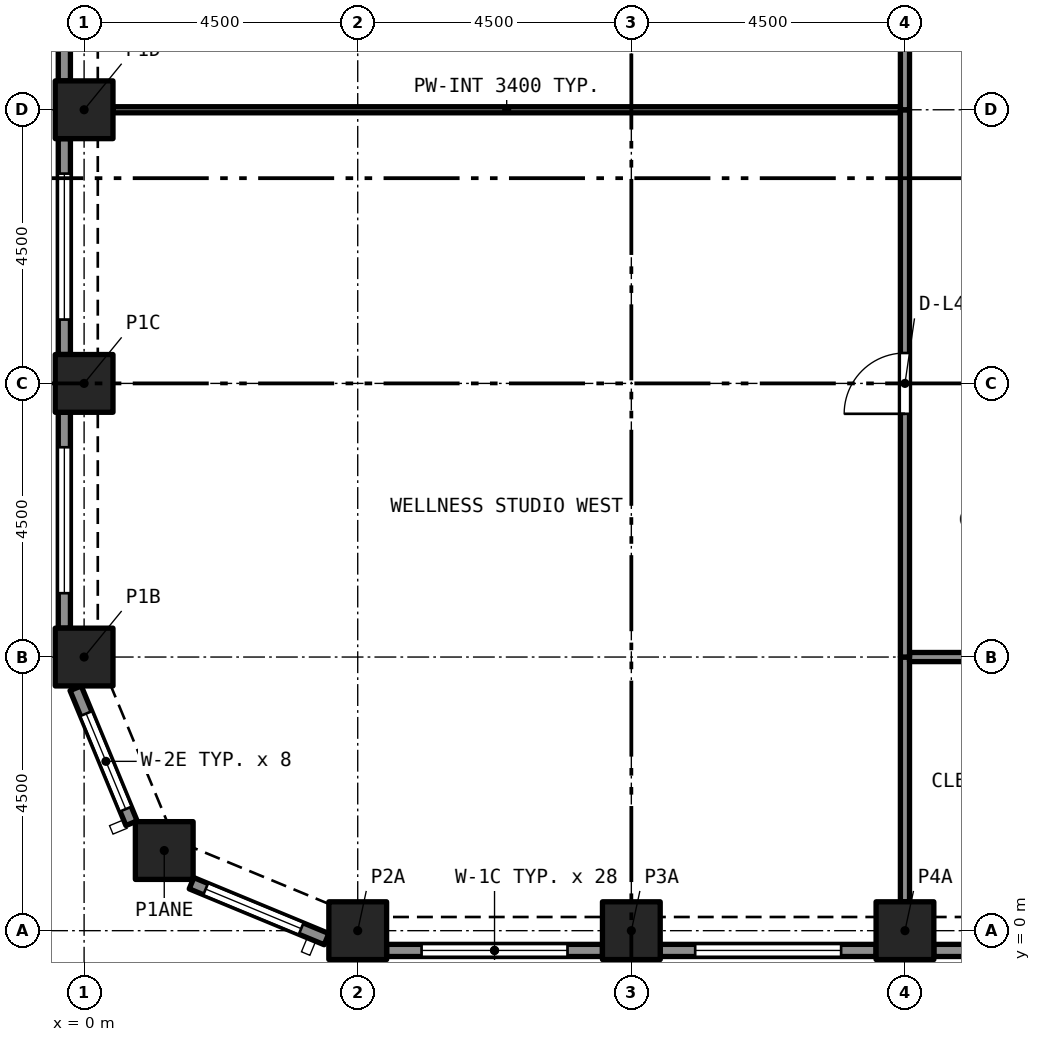
"""IFC4 building model, lengths in metres.
Left out: names, types, materials, properties, quantities, classifications, styles, units other than length and angle.
Written with IfcOpenShell. Run it as: python <this file> out.ifc"""

import sys

from ifc_helpers import new_model, si_unit, direction, frame, frame_2d, origin, origin_2d, place, context, subcontext, project, spatial, rectangle, extrude, element, fill, save


model = new_model("IFC4")
c1 = context("Model", 3, precision=1e-05, world=origin(), true_north=direction((0.0, 1.0)))
c2 = subcontext(c1, "Body", "Model", "MODEL_VIEW")
j1 = project(units=[si_unit("LENGTHUNIT", "METRE"), si_unit("PLANEANGLEUNIT", "RADIAN")], contexts=[c1])
p1 = place(None, origin())
s1 = spatial("IfcSite", under=j1, at=p1, CompositionType="ELEMENT")
p2 = place(p1, origin())
s2 = spatial("IfcBuilding", under=s1, at=p2, CompositionType="ELEMENT")
p3 = place(p2, frame((0.0, 0.0, 172.6)))
s3 = spatial("IfcBuildingStorey", under=s2, at=p3, CompositionType="ELEMENT", Elevation=172.6)
for number, where, z_axis, x_axis in (
    (1, (4.5, 0.0, 0.0), (0.0, 0.0, 1.0), (1.0, 0.0, 0.0)),
    (2, (9.0, 0.0, 0.0), (0.0, 0.0, 1.0), (1.0, 0.0, 0.0)),
    (3, (13.5, 0.0, 0.0), (0.0, 0.0, 1.0), (1.0, 0.0, 0.0)),
    (4, (1.318, 1.318, 0.0), (0.0, 0.0, 1.0), (1.0, 0.0, 0.0)),
    (5, (0.0, 4.5, 0.0), (0.0, 0.0, 1.0), (1.0, 0.0, 0.0)),
    (6, (0.0, 9.0, 0.0), (0.0, 0.0, 1.0), (1.0, 0.0, 0.0)),
    (7, (0.0, 13.5, 0.0), (0.0, 0.0, 1.0), (1.0, 0.0, 0.0)),
):
    element("IfcColumn", number, at=place(p3, frame(where, z_axis=z_axis, x_axis=x_axis)), inside=s3, PredefinedType="COLUMN", context=c2, shape_type="SweptSolid", body=[
        extrude(rectangle(XDim=0.95, YDim=0.95, at=origin_2d()), origin(), (0.0, 0.0, 1.0), 3.7),
    ])
p4 = place(p3, frame((0.78, 1.767, 0.0), z_axis=(0.0, 0.0, 1.0), x_axis=(-0.382680855588, 0.923880599843, 0.0)))
e8 = element("IfcWall", 8, at=p4, inside=s3, PredefinedType="SOLIDWALL", context=c2, shape_type="SweptSolid", body=[
    extrude(rectangle(XDim=2.403, YDim=0.2, at=frame_2d((1.201, 0.0))), origin(), (0.0, 0.0, 1.0), 3.7),
])
p5 = place(p4, frame((0.251, 0.0, 0.45)))
e9 = element("IfcOpeningElement", 9, at=p5, cuts=e8, PredefinedType="OPENING", context=c2, shape_type="SweptSolid", body=[
    extrude(rectangle(XDim=1.7, YDim=1.95, at=frame_2d((0.85, 0.975))), frame((0.0, 0.11, 0.0), z_axis=(0.0, -1.0, 0.0), x_axis=(1.0, 0.0, 0.0)), (0.0, 0.0, 1.0), 0.22),
])
p6 = place(p3, frame((3.987, -0.139, 0.0), z_axis=(0.0, 0.0, 1.0), x_axis=(-0.923880599843, 0.382680855588, 0.0)))
e10 = element("IfcWall", 10, at=p6, inside=s3, PredefinedType="SOLIDWALL", context=c2, shape_type="SweptSolid", body=[
    extrude(rectangle(XDim=2.403, YDim=0.2, at=frame_2d((1.201, 0.0))), origin(), (0.0, 0.0, 1.0), 3.7),
])
p7 = place(p6, frame((0.451, 0.0, 0.45)))
e11 = element("IfcOpeningElement", 11, at=p7, cuts=e10, PredefinedType="OPENING", context=c2, shape_type="SweptSolid", body=[
    extrude(rectangle(XDim=1.7, YDim=1.95, at=frame_2d((0.85, 0.975))), frame((0.0, 0.11, 0.0), z_axis=(0.0, -1.0, 0.0), x_axis=(1.0, 0.0, 0.0)), (0.0, 0.0, 1.0), 0.22),
])
p8 = place(p3, frame((8.525, -0.325, 0.0), z_axis=(0.0, 0.0, 1.0), x_axis=(-1.0, 0.0, 0.0)))
e12 = element("IfcWall", 12, at=p8, inside=s3, PredefinedType="SOLIDWALL", context=c2, shape_type="SweptSolid", body=[
    extrude(rectangle(XDim=3.55, YDim=0.2, at=frame_2d((1.775, 0.0))), origin(), (0.0, 0.0, 1.0), 3.7),
])
p9 = place(p8, frame((0.575, 0.0, 0.45)))
e13 = element("IfcOpeningElement", 13, at=p9, cuts=e12, PredefinedType="OPENING", context=c2, shape_type="SweptSolid", body=[
    extrude(rectangle(XDim=2.4, YDim=1.95, at=frame_2d((1.2, 0.975))), frame((0.0, 0.11, 0.0), z_axis=(0.0, -1.0, 0.0), x_axis=(1.0, 0.0, 0.0)), (0.0, 0.0, 1.0), 0.22),
])
p10 = place(p3, frame((13.025, -0.325, 0.0), z_axis=(0.0, 0.0, 1.0), x_axis=(-1.0, 0.0, 0.0)))
e14 = element("IfcWall", 14, at=p10, inside=s3, PredefinedType="SOLIDWALL", context=c2, shape_type="SweptSolid", body=[
    extrude(rectangle(XDim=3.55, YDim=0.2, at=frame_2d((1.775, 0.0))), origin(), (0.0, 0.0, 1.0), 3.7),
])
p11 = place(p10, frame((0.575, 0.0, 0.45)))
e15 = element("IfcOpeningElement", 15, at=p11, cuts=e14, PredefinedType="OPENING", context=c2, shape_type="SweptSolid", body=[
    extrude(rectangle(XDim=2.4, YDim=1.95, at=frame_2d((1.2, 0.975))), frame((0.0, 0.11, 0.0), z_axis=(0.0, -1.0, 0.0), x_axis=(1.0, 0.0, 0.0)), (0.0, 0.0, 1.0), 0.22),
])
p12 = place(p3, frame((17.525, -0.325, 0.0), z_axis=(0.0, 0.0, 1.0), x_axis=(-1.0, 0.0, 0.0)))
e16 = element("IfcWall", 16, at=p12, inside=s3, PredefinedType="SOLIDWALL", context=c2, shape_type="SweptSolid", body=[
    extrude(rectangle(XDim=3.55, YDim=0.2, at=frame_2d((1.775, 0.0))), origin(), (0.0, 0.0, 1.0), 3.7),
])
p13 = place(p12, frame((0.575, 0.0, 0.45)))
e17 = element("IfcOpeningElement", 17, at=p13, cuts=e16, PredefinedType="OPENING", context=c2, shape_type="SweptSolid", body=[
    extrude(rectangle(XDim=2.4, YDim=1.95, at=frame_2d((1.2, 0.975))), frame((0.0, 0.11, 0.0), z_axis=(0.0, -1.0, 0.0), x_axis=(1.0, 0.0, 0.0)), (0.0, 0.0, 1.0), 0.22),
])
p14 = place(p3, frame((-0.325, 13.975, 0.0), z_axis=(0.0, 0.0, 1.0), x_axis=(0.0, 1.0, 0.0)))
e18 = element("IfcWall", 18, at=p14, inside=s3, PredefinedType="SOLIDWALL", context=c2, shape_type="SweptSolid", body=[
    extrude(rectangle(XDim=3.55, YDim=0.2, at=frame_2d((1.775, 0.0))), origin(), (0.0, 0.0, 1.0), 3.7),
])
p15 = place(p14, frame((0.575, 0.0, 0.45)))
e19 = element("IfcOpeningElement", 19, at=p15, cuts=e18, PredefinedType="OPENING", context=c2, shape_type="SweptSolid", body=[
    extrude(rectangle(XDim=2.4, YDim=1.95, at=frame_2d((1.2, 0.975))), frame((0.0, 0.11, 0.0), z_axis=(0.0, -1.0, 0.0), x_axis=(1.0, 0.0, 0.0)), (0.0, 0.0, 1.0), 0.22),
])
p16 = place(p3, frame((-0.325, 9.475, 0.0), z_axis=(0.0, 0.0, 1.0), x_axis=(0.0, 1.0, 0.0)))
e20 = element("IfcWall", 20, at=p16, inside=s3, PredefinedType="SOLIDWALL", context=c2, shape_type="SweptSolid", body=[
    extrude(rectangle(XDim=3.55, YDim=0.2, at=frame_2d((1.775, 0.0))), origin(), (0.0, 0.0, 1.0), 3.7),
])
p17 = place(p16, frame((0.575, 0.0, 0.45)))
e21 = element("IfcOpeningElement", 21, at=p17, cuts=e20, PredefinedType="OPENING", context=c2, shape_type="SweptSolid", body=[
    extrude(rectangle(XDim=2.4, YDim=1.95, at=frame_2d((1.2, 0.975))), frame((0.0, 0.11, 0.0), z_axis=(0.0, -1.0, 0.0), x_axis=(1.0, 0.0, 0.0)), (0.0, 0.0, 1.0), 0.22),
])
p18 = place(p3, frame((-0.325, 4.975, 0.0), z_axis=(0.0, 0.0, 1.0), x_axis=(0.0, 1.0, 0.0)))
e22 = element("IfcWall", 22, at=p18, inside=s3, PredefinedType="SOLIDWALL", context=c2, shape_type="SweptSolid", body=[
    extrude(rectangle(XDim=3.55, YDim=0.2, at=frame_2d((1.775, 0.0))), origin(), (0.0, 0.0, 1.0), 3.7),
])
p19 = place(p18, frame((0.575, 0.0, 0.45)))
e23 = element("IfcOpeningElement", 23, at=p19, cuts=e22, PredefinedType="OPENING", context=c2, shape_type="SweptSolid", body=[
    extrude(rectangle(XDim=2.4, YDim=1.95, at=frame_2d((1.2, 0.975))), frame((0.0, 0.11, 0.0), z_axis=(0.0, -1.0, 0.0), x_axis=(1.0, 0.0, 0.0)), (0.0, 0.0, 1.0), 0.22),
])
p20 = place(p3, frame((13.5, 0.475, 0.0), z_axis=(0.0, 0.0, 1.0), x_axis=(0.0, 1.0, 0.0)))
e24 = element("IfcWall", 24, at=p20, inside=s3, PredefinedType="PARTITIONING", context=c2, shape_type="SweptSolid", body=[
    extrude(rectangle(XDim=4.025, YDim=0.15, at=frame_2d((2.012, 0.0))), origin(), (0.0, 0.0, 1.0), 3.4),
])
p21 = place(p3, frame((17.525, 4.5, 0.0), z_axis=(0.0, 0.0, 1.0), x_axis=(-1.0, 0.0, 0.0)))
e25 = element("IfcWall", 25, at=p21, inside=s3, PredefinedType="PARTITIONING", context=c2, shape_type="SweptSolid", body=[
    extrude(rectangle(XDim=3.95, YDim=0.15, at=frame_2d((1.975, 0.0))), origin(), (0.0, 0.0, 1.0), 3.4),
])
p22 = place(p21, frame((1.613, 0.0, 0.0)))
e26 = element("IfcOpeningElement", 26, at=p22, cuts=e25, PredefinedType="OPENING", context=c2, shape_type="SweptSolid", body=[
    extrude(rectangle(XDim=0.8, YDim=2.1, at=frame_2d((0.4, 1.05))), frame((0.0, 0.085, 0.0), z_axis=(0.0, -1.0, 0.0), x_axis=(1.0, 0.0, 0.0)), (0.0, 0.0, 1.0), 0.17),
])
p23 = place(p3, frame((13.5, 4.5, 0.0), z_axis=(0.0, 0.0, 1.0), x_axis=(0.0, 1.0, 0.0)))
e27 = element("IfcWall", 27, at=p23, inside=s3, PredefinedType="PARTITIONING", context=c2, shape_type="SweptSolid", body=[
    extrude(rectangle(XDim=9.0, YDim=0.15, at=frame_2d((4.5, 0.0))), origin(), (0.0, 0.0, 1.0), 3.4),
])
p24 = place(p23, frame((4.0, 0.0, 0.0)))
e28 = element("IfcOpeningElement", 28, at=p24, cuts=e27, PredefinedType="OPENING", context=c2, shape_type="SweptSolid", body=[
    extrude(rectangle(XDim=1.0, YDim=2.1, at=frame_2d((0.5, 1.05))), frame((0.0, 0.085, 0.0), z_axis=(0.0, -1.0, 0.0), x_axis=(1.0, 0.0, 0.0)), (0.0, 0.0, 1.0), 0.17),
])
p25 = place(p3, frame((13.5, 13.5, 0.0), z_axis=(0.0, 0.0, 1.0), x_axis=(0.0, 1.0, 0.0)))
e29 = element("IfcWall", 29, at=p25, inside=s3, PredefinedType="PARTITIONING", context=c2, shape_type="SweptSolid", body=[
    extrude(rectangle(XDim=8.525, YDim=0.15, at=frame_2d((4.262, 0.0))), origin(), (0.0, 0.0, 1.0), 3.4),
])
p26 = place(p25, frame((3.762, 0.0, 0.0)))
e30 = element("IfcOpeningElement", 30, at=p26, cuts=e29, PredefinedType="OPENING", context=c2, shape_type="SweptSolid", body=[
    extrude(rectangle(XDim=1.0, YDim=2.1, at=frame_2d((0.5, 1.05))), frame((0.0, 0.085, 0.0), z_axis=(0.0, -1.0, 0.0), x_axis=(1.0, 0.0, 0.0)), (0.0, 0.0, 1.0), 0.17),
])
p27 = place(p3, frame((0.475, 13.5, 0.0), z_axis=(0.0, 0.0, 1.0), x_axis=(1.0, 0.0, 0.0)))
e31 = element("IfcWall", 31, at=p27, inside=s3, PredefinedType="PARTITIONING", context=c2, shape_type="SweptSolid", body=[
    extrude(rectangle(XDim=12.95, YDim=0.1, at=frame_2d((6.475, 0.0))), origin(), (0.0, 0.0, 1.0), 3.4),
])
p28 = place(p5, origin())
e32 = element("IfcWindow", 32, at=p28, inside=s3, PartitioningType="SINGLE_PANEL", PredefinedType="WINDOW", context=c2, shape_type="SweptSolid", body=[
    extrude(rectangle(XDim=1.7, YDim=1.95, at=frame_2d((0.85, 0.975))), frame((0.0, 0.03, 0.0), z_axis=(0.0, -1.0, 0.0), x_axis=(1.0, 0.0, 0.0)), (0.0, 0.0, 1.0), 0.06),
])
fill(e9, e32)
p29 = place(p7, origin())
e33 = element("IfcWindow", 33, at=p29, inside=s3, PartitioningType="SINGLE_PANEL", PredefinedType="WINDOW", context=c2, shape_type="SweptSolid", body=[
    extrude(rectangle(XDim=1.7, YDim=1.95, at=frame_2d((0.85, 0.975))), frame((0.0, 0.03, 0.0), z_axis=(0.0, -1.0, 0.0), x_axis=(1.0, 0.0, 0.0)), (0.0, 0.0, 1.0), 0.06),
])
fill(e11, e33)
p30 = place(p9, origin())
e34 = element("IfcWindow", 34, at=p30, inside=s3, PartitioningType="SINGLE_PANEL", PredefinedType="WINDOW", context=c2, shape_type="SweptSolid", body=[
    extrude(rectangle(XDim=2.4, YDim=1.95, at=frame_2d((1.2, 0.975))), frame((0.0, 0.03, 0.0), z_axis=(0.0, -1.0, 0.0), x_axis=(1.0, 0.0, 0.0)), (0.0, 0.0, 1.0), 0.06),
])
fill(e13, e34)
p31 = place(p11, origin())
e35 = element("IfcWindow", 35, at=p31, inside=s3, PartitioningType="SINGLE_PANEL", PredefinedType="WINDOW", context=c2, shape_type="SweptSolid", body=[
    extrude(rectangle(XDim=2.4, YDim=1.95, at=frame_2d((1.2, 0.975))), frame((0.0, 0.03, 0.0), z_axis=(0.0, -1.0, 0.0), x_axis=(1.0, 0.0, 0.0)), (0.0, 0.0, 1.0), 0.06),
])
fill(e15, e35)
p32 = place(p17, origin())
e36 = element("IfcWindow", 36, at=p32, inside=s3, PartitioningType="SINGLE_PANEL", PredefinedType="WINDOW", context=c2, shape_type="SweptSolid", body=[
    extrude(rectangle(XDim=2.4, YDim=1.95, at=frame_2d((1.2, 0.975))), frame((0.0, 0.03, 0.0), z_axis=(0.0, -1.0, 0.0), x_axis=(1.0, 0.0, 0.0)), (0.0, 0.0, 1.0), 0.06),
])
fill(e21, e36)
p33 = place(p19, origin())
e37 = element("IfcWindow", 37, at=p33, inside=s3, PartitioningType="SINGLE_PANEL", PredefinedType="WINDOW", context=c2, shape_type="SweptSolid", body=[
    extrude(rectangle(XDim=2.4, YDim=1.95, at=frame_2d((1.2, 0.975))), frame((0.0, 0.03, 0.0), z_axis=(0.0, -1.0, 0.0), x_axis=(1.0, 0.0, 0.0)), (0.0, 0.0, 1.0), 0.06),
])
fill(e23, e37)
p34 = place(p24, origin())
e38 = element("IfcDoor", 38, at=p34, inside=s3, OperationType="SINGLE_SWING_RIGHT", PredefinedType="DOOR", context=c2, shape_type="SweptSolid", body=[
    extrude(rectangle(XDim=1.0, YDim=2.1, at=frame_2d((0.5, 1.05))), frame((0.0, 0.025, 0.0), z_axis=(0.0, -1.0, 0.0), x_axis=(1.0, 0.0, 0.0)), (0.0, 0.0, 1.0), 0.05),
])
fill(e28, e38)
save(model, sys.argv[1])
